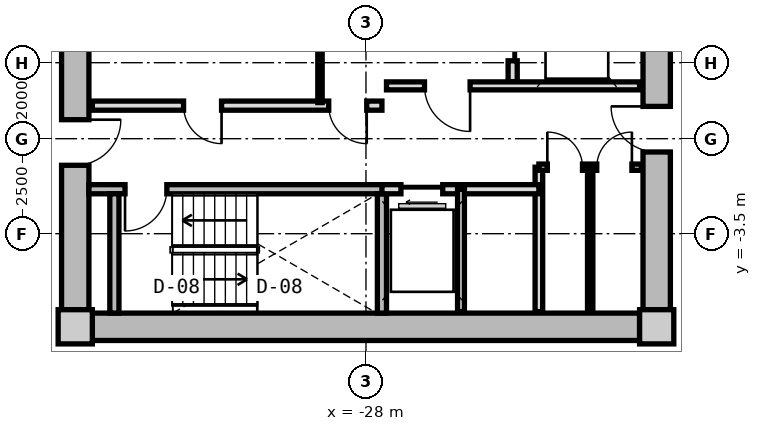
"""IFC4 building model, lengths in metres.
Left out: names, types, materials, properties, quantities, classifications, styles, units other than length and angle.
Written with IfcOpenShell. Run it as: python <this file> out.ifc"""

import sys

from ifc_helpers import new_model, si_unit, direction, frame, frame_2d, origin, origin_2d, place, context, subcontext, project, spatial, rectangle, extrude, source, transform, mapped, element, fill, save


model = new_model("IFC4")
c1 = context("Model", 3, precision=1e-05, world=origin(), true_north=direction((0.0, 1.0)))
c2 = subcontext(c1, "Body", "Model", "MODEL_VIEW")
j1 = project(units=[si_unit("LENGTHUNIT", "METRE"), si_unit("PLANEANGLEUNIT", "RADIAN")], contexts=[c1])
p1 = place(None, origin())
s1 = spatial("IfcSite", under=j1, at=p1, CompositionType="ELEMENT")
p2 = place(p1, origin())
s2 = spatial("IfcBuilding", under=s1, at=p2, CompositionType="ELEMENT")
p3 = place(p2, frame((0.0, 0.0, 126.75)))
s3 = spatial("IfcBuildingStorey", under=s2, at=p3, CompositionType="ELEMENT", Elevation=126.75)
m1 = source(origin(), c2, "Body", "SweptSolid", [
    extrude(rectangle(XDim=0.9, YDim=0.9, at=origin_2d()), origin(), (0.0, 0.0, 1.0), 3.05),
])
for number, where, z_axis, x_axis in (
    (1, (-35.65, -5.95, 0.0), (0.0, 0.0, 1.0), (1.0, 0.0, 0.0)),
    (2, (-20.35, -5.95, 0.0), (0.0, 0.0, 1.0), (1.0, 0.0, 0.0)),
):
    element("IfcColumn", number, at=place(p3, frame(where, z_axis=z_axis, x_axis=x_axis)), inside=s3, PredefinedType="COLUMN", context=c2, shape_type="MappedRepresentation", body=[
        mapped(m1, transform((0.0, 0.0, 0.0), x_axis=(1.0, 0.0, 0.0), y_axis=(0.0, 1.0, 0.0), z_axis=(0.0, 0.0, 1.0), scale=1.0)),
    ])
m2 = source(origin(), c2, "Body", "SweptSolid", [
    extrude(rectangle(XDim=14.4, YDim=0.72, at=frame_2d((7.2, 0.0))), origin(), (0.0, 0.0, 1.0), 2.73),
])
p4 = place(p3, frame((-20.8, -5.95, 0.0), z_axis=(0.0, 0.0, 1.0), x_axis=(-1.0, 0.0, 0.0)))
e3 = element("IfcWall", 3, at=p4, inside=s3, PredefinedType="SHEAR", context=c2, shape_type="MappedRepresentation", body=[
    mapped(m2, transform((0.0, 0.0, 0.0), x_axis=(1.0, 0.0, 0.0), y_axis=(0.0, 1.0, 0.0), z_axis=(0.0, 0.0, 1.0), scale=1.0)),
])
m3 = source(origin(), c2, "Body", "SweptSolid", [
    extrude(rectangle(XDim=11.0, YDim=0.72, at=frame_2d((5.5, 0.0))), origin(), (0.0, 0.0, 1.0), 2.73),
])
p5 = place(p3, frame((-35.65, -5.5, 0.0), z_axis=(0.0, 0.0, 1.0), x_axis=(0.0, 1.0, 0.0)))
e4 = element("IfcWall", 4, at=p5, inside=s3, PredefinedType="SHEAR", context=c2, shape_type="MappedRepresentation", body=[
    mapped(m3, transform((0.0, 0.0, 0.0), x_axis=(1.0, 0.0, 0.0), y_axis=(0.0, 1.0, 0.0), z_axis=(0.0, 0.0, 1.0), scale=1.0)),
])
p6 = place(p5, frame((3.8, 0.0, 0.0)))
e5 = element("IfcOpeningElement", 5, at=p6, cuts=e4, PredefinedType="OPENING", context=c2, shape_type="SweptSolid", body=[
    extrude(rectangle(XDim=1.2, YDim=2.15, at=frame_2d((0.6, 1.075))), frame((0.0, 0.37, 0.0), z_axis=(0.0, -1.0, 0.0), x_axis=(1.0, 0.0, 0.0)), (0.0, 0.0, 1.0), 0.74),
])
p7 = place(p3, frame((-20.35, 5.5, 0.0), z_axis=(0.0, 0.0, 1.0), x_axis=(0.0, -1.0, 0.0)))
e6 = element("IfcWall", 6, at=p7, inside=s3, PredefinedType="SHEAR", context=c2, shape_type="MappedRepresentation", body=[
    mapped(m3, transform((0.0, 0.0, 0.0), x_axis=(1.0, 0.0, 0.0), y_axis=(0.0, 1.0, 0.0), z_axis=(0.0, 0.0, 1.0), scale=1.0)),
])
p8 = place(p7, frame((5.65, 0.0, 0.0)))
e7 = element("IfcOpeningElement", 7, at=p8, cuts=e6, PredefinedType="OPENING", context=c2, shape_type="SweptSolid", body=[
    extrude(rectangle(XDim=1.2, YDim=2.15, at=frame_2d((0.6, 1.075))), frame((0.0, 0.37, 0.0), z_axis=(0.0, -1.0, 0.0), x_axis=(1.0, 0.0, 0.0)), (0.0, 0.0, 1.0), 0.74),
])
m4 = source(origin(), c2, "Body", "SweptSolid", [
    extrude(rectangle(XDim=7.83, YDim=0.24, at=frame_2d((3.915, 0.0))), origin(), (0.0, 0.0, 1.0), 2.73),
])
p9 = place(p3, frame((-35.29, -2.33, 0.0), z_axis=(0.0, 0.0, 1.0), x_axis=(1.0, 0.0, 0.0)))
e8 = element("IfcWall", 8, at=p9, inside=s3, PredefinedType="PARTITIONING", context=c2, shape_type="MappedRepresentation", body=[
    mapped(m4, transform((0.0, 0.0, 0.0), x_axis=(1.0, 0.0, 0.0), y_axis=(0.0, 1.0, 0.0), z_axis=(0.0, 0.0, 1.0), scale=1.0)),
])
p10 = place(p9, frame((0.95, 0.0, 0.0)))
e9 = element("IfcOpeningElement", 9, at=p10, cuts=e8, PredefinedType="OPENING", context=c2, shape_type="SweptSolid", body=[
    extrude(rectangle(XDim=1.1, YDim=2.15, at=frame_2d((0.55, 1.075))), frame((0.0, 0.13, 0.0), z_axis=(0.0, -1.0, 0.0), x_axis=(1.0, 0.0, 0.0)), (0.0, 0.0, 1.0), 0.26),
])
m5 = source(origin(), c2, "Body", "SweptSolid", [
    extrude(rectangle(XDim=3.14, YDim=0.24, at=frame_2d((1.57, 0.0))), origin(), (0.0, 0.0, 1.0), 2.73),
])
for number, where, z_axis, x_axis in (
    (10, (-34.62, -5.59, 0.0), (0.0, 0.0, 1.0), (0.0, 1.0, 0.0)),
    (11, (-27.58, -5.59, 0.0), (0.0, 0.0, 1.0), (0.0, 1.0, 0.0)),
):
    element("IfcWall", number, at=place(p3, frame(where, z_axis=z_axis, x_axis=x_axis)), inside=s3, PredefinedType="PARTITIONING", context=c2, shape_type="MappedRepresentation", body=[
        mapped(m5, transform((0.0, 0.0, 0.0), x_axis=(1.0, 0.0, 0.0), y_axis=(0.0, 1.0, 0.0), z_axis=(0.0, 0.0, 1.0), scale=1.0)),
    ])
m6 = source(origin(), c2, "Body", "SweptSolid", [
    extrude(rectangle(XDim=5.0, YDim=0.24, at=frame_2d((2.5, 0.0))), origin(), (0.0, 0.0, 1.0), 2.715),
])
p11 = place(p3, frame((-24.14, 0.5, 0.0), z_axis=(0.0, 0.0, 1.0), x_axis=(0.0, 1.0, 0.0)))
e12 = element("IfcWall", 12, at=p11, inside=s3, PredefinedType="PARTITIONING", context=c2, shape_type="MappedRepresentation", body=[
    mapped(m6, transform((0.0, 0.0, 0.0), x_axis=(1.0, 0.0, 0.0), y_axis=(0.0, 1.0, 0.0), z_axis=(0.0, 0.0, 1.0), scale=1.0)),
])
p12 = place(p11, frame((3.05, 0.0, 0.0)))
e13 = element("IfcOpeningElement", 13, at=p12, cuts=e12, PredefinedType="OPENING", context=c2, shape_type="SweptSolid", body=[
    extrude(rectangle(XDim=1.3, YDim=2.2, at=frame_2d((0.65, 1.1))), frame((0.0, 0.13, 0.0), z_axis=(0.0, -1.0, 0.0), x_axis=(1.0, 0.0, 0.0)), (0.0, 0.0, 1.0), 0.26),
])
p13 = place(p11, frame((0.55, 0.0, 0.0)))
e14 = element("IfcOpeningElement", 14, at=p13, cuts=e12, PredefinedType="OPENING", context=c2, shape_type="SweptSolid", body=[
    extrude(rectangle(XDim=1.3, YDim=2.2, at=frame_2d((0.65, 1.1))), frame((0.0, 0.13, 0.0), z_axis=(0.0, -1.0, 0.0), x_axis=(1.0, 0.0, 0.0)), (0.0, 0.0, 1.0), 0.26),
])
m7 = source(origin(), c2, "Body", "SweptSolid", [
    extrude(rectangle(XDim=6.66, YDim=0.21, at=frame_2d((3.33, 0.0))), origin(), (0.0, 0.0, 1.0), 2.715),
])
p14 = place(p3, frame((-27.46, 0.39, 0.0), z_axis=(0.0, 0.0, 1.0), x_axis=(1.0, 0.0, 0.0)))
e15 = element("IfcWall", 15, at=p14, inside=s3, PredefinedType="PARTITIONING", context=c2, shape_type="MappedRepresentation", body=[
    mapped(m7, transform((0.0, 0.0, 0.0), x_axis=(1.0, 0.0, 0.0), y_axis=(0.0, 1.0, 0.0), z_axis=(0.0, 0.0, 1.0), scale=1.0)),
])
p15 = place(p14, frame((1.0, 0.0, 0.0)))
e16 = element("IfcOpeningElement", 16, at=p15, cuts=e15, PredefinedType="OPENING", context=c2, shape_type="SweptSolid", body=[
    extrude(rectangle(XDim=1.2, YDim=2.15, at=frame_2d((0.6, 1.075))), frame((0.0, 0.115, 0.0), z_axis=(0.0, -1.0, 0.0), x_axis=(1.0, 0.0, 0.0)), (0.0, 0.0, 1.0), 0.23),
])
m8 = source(origin(), c2, "Body", "SweptSolid", [
    extrude(rectangle(XDim=7.62, YDim=0.24, at=frame_2d((3.81, 0.0))), origin(), (0.0, 0.0, 1.0), 2.715),
])
p16 = place(p3, frame((-35.2, -0.13, 0.0), z_axis=(0.0, 0.0, 1.0), x_axis=(1.0, 0.0, 0.0)))
e17 = element("IfcWall", 17, at=p16, inside=s3, PredefinedType="PARTITIONING", context=c2, shape_type="MappedRepresentation", body=[
    mapped(m8, transform((0.0, 0.0, 0.0), x_axis=(1.0, 0.0, 0.0), y_axis=(0.0, 1.0, 0.0), z_axis=(0.0, 0.0, 1.0), scale=1.0)),
])
p17 = place(p16, frame((6.22, 0.0, 0.0)))
e18 = element("IfcOpeningElement", 18, at=p17, cuts=e17, PredefinedType="OPENING", context=c2, shape_type="SweptSolid", body=[
    extrude(rectangle(XDim=1.0, YDim=2.1, at=frame_2d((0.5, 1.05))), frame((0.0, 0.13, 0.0), z_axis=(0.0, -1.0, 0.0), x_axis=(1.0, 0.0, 0.0)), (0.0, 0.0, 1.0), 0.26),
])
p18 = place(p16, frame((2.4, 0.0, 0.0)))
e19 = element("IfcOpeningElement", 19, at=p18, cuts=e17, PredefinedType="OPENING", context=c2, shape_type="SweptSolid", body=[
    extrude(rectangle(XDim=1.0, YDim=2.1, at=frame_2d((0.5, 1.05))), frame((0.0, 0.13, 0.0), z_axis=(0.0, -1.0, 0.0), x_axis=(1.0, 0.0, 0.0)), (0.0, 0.0, 1.0), 0.26),
])
m9 = source(origin(), c2, "Body", "SweptSolid", [
    extrude(rectangle(XDim=2.33, YDim=0.115, at=frame_2d((1.165, 0.0))), origin(), (0.0, 0.0, 1.0), 2.715),
])
p19 = place(p3, frame((-29.21, -0.05, 0.0), z_axis=(0.0, 0.0, 1.0), x_axis=(0.0, 1.0, 0.0)))
e20 = element("IfcWall", 20, at=p19, inside=s3, PredefinedType="PARTITIONING", context=c2, shape_type="MappedRepresentation", body=[
    mapped(m9, transform((0.0, 0.0, 0.0), x_axis=(1.0, 0.0, 0.0), y_axis=(0.0, 1.0, 0.0), z_axis=(0.0, 0.0, 1.0), scale=1.0)),
])
m10 = source(origin(), c2, "Body", "SweptSolid", [
    extrude(rectangle(XDim=3.8, YDim=0.2, at=frame_2d((1.9, 0.0))), origin(), (0.0, 0.0, 1.0), 2.715),
])
p20 = place(p3, frame((-23.45, -5.55, 0.0), z_axis=(0.0, 0.0, 1.0), x_axis=(0.0, 1.0, 0.0)))
e21 = element("IfcWall", 21, at=p20, inside=s3, PredefinedType="PARTITIONING", context=c2, shape_type="MappedRepresentation", body=[
    mapped(m10, transform((0.0, 0.0, 0.0), x_axis=(1.0, 0.0, 0.0), y_axis=(0.0, 1.0, 0.0), z_axis=(0.0, 0.0, 1.0), scale=1.0)),
])
m11 = source(origin(), c2, "Body", "SweptSolid", [
    extrude(rectangle(XDim=4.13, YDim=0.24, at=frame_2d((2.065, 0.0))), origin(), (0.0, 0.0, 1.0), 2.715),
])
p21 = place(p3, frame((-27.58, -2.33, 0.0), z_axis=(0.0, 0.0, 1.0), x_axis=(1.0, 0.0, 0.0)))
e22 = element("IfcWall", 22, at=p21, inside=s3, PredefinedType="PARTITIONING", context=c2, shape_type="MappedRepresentation", body=[
    mapped(m11, transform((0.0, 0.0, 0.0), x_axis=(1.0, 0.0, 0.0), y_axis=(0.0, 1.0, 0.0), z_axis=(0.0, 0.0, 1.0), scale=1.0)),
])
p22 = place(p21, frame((0.5, 0.0, 0.0)))
e23 = element("IfcOpeningElement", 23, at=p22, cuts=e22, PredefinedType="OPENING", context=c2, shape_type="SweptSolid", body=[
    extrude(rectangle(XDim=1.1, YDim=2.2, at=frame_2d((0.55, 1.1))), frame((0.0, 0.13, 0.0), z_axis=(0.0, -1.0, 0.0), x_axis=(1.0, 0.0, 0.0)), (0.0, 0.0, 1.0), 0.26),
])
m12 = source(origin(), c2, "Body", "SweptSolid", [
    extrude(rectangle(XDim=3.22, YDim=0.18, at=frame_2d((1.61, 0.0))), origin(), (0.0, 0.0, 1.0), 2.715),
])
p23 = place(p3, frame((-25.5, -5.55, 0.0), z_axis=(0.0, 0.0, 1.0), x_axis=(0.0, 1.0, 0.0)))
e24 = element("IfcWall", 24, at=p23, inside=s3, PredefinedType="PARTITIONING", context=c2, shape_type="MappedRepresentation", body=[
    mapped(m12, transform((0.0, 0.0, 0.0), x_axis=(1.0, 0.0, 0.0), y_axis=(0.0, 1.0, 0.0), z_axis=(0.0, 0.0, 1.0), scale=1.0)),
])
m13 = source(origin(), c2, "Body", "SweptSolid", [
    extrude(rectangle(XDim=2.7, YDim=0.165, at=frame_2d((1.35, 0.0))), origin(), (0.0, 0.0, 1.0), 2.715),
])
p24 = place(p3, frame((-23.45, -1.75, 0.0), z_axis=(0.0, 0.0, 1.0), x_axis=(1.0, 0.0, 0.0)))
e25 = element("IfcWall", 25, at=p24, inside=s3, PredefinedType="PARTITIONING", context=c2, shape_type="MappedRepresentation", body=[
    mapped(m13, transform((0.0, 0.0, 0.0), x_axis=(1.0, 0.0, 0.0), y_axis=(0.0, 1.0, 0.0), z_axis=(0.0, 0.0, 1.0), scale=1.0)),
])
p25 = place(p24, frame((0.222, 0.0, 0.0)))
e26 = element("IfcOpeningElement", 26, at=p25, cuts=e25, PredefinedType="OPENING", context=c2, shape_type="SweptSolid", body=[
    extrude(rectangle(XDim=0.925, YDim=2.1, at=frame_2d((0.462, 1.05))), frame((0.0, 0.093, 0.0), z_axis=(0.0, -1.0, 0.0), x_axis=(1.0, 0.0, 0.0)), (0.0, 0.0, 1.0), 0.185),
])
p26 = place(p24, frame((1.522, 0.0, 0.0)))
e27 = element("IfcOpeningElement", 27, at=p26, cuts=e25, PredefinedType="OPENING", context=c2, shape_type="SweptSolid", body=[
    extrude(rectangle(XDim=0.925, YDim=2.1, at=frame_2d((0.462, 1.05))), frame((0.0, 0.093, 0.0), z_axis=(0.0, -1.0, 0.0), x_axis=(1.0, 0.0, 0.0)), (0.0, 0.0, 1.0), 0.185),
])
m14 = source(origin(), c2, "Body", "SweptSolid", [
    extrude(rectangle(XDim=3.8, YDim=0.14, at=frame_2d((1.9, 0.0))), origin(), (0.0, 0.0, 1.0), 2.715),
])
p27 = place(p3, frame((-22.1, -5.55, 0.0), z_axis=(0.0, 0.0, 1.0), x_axis=(0.0, 1.0, 0.0)))
e28 = element("IfcWall", 28, at=p27, inside=s3, PredefinedType="PARTITIONING", context=c2, shape_type="MappedRepresentation", body=[
    mapped(m14, transform((0.0, 0.0, 0.0), x_axis=(1.0, 0.0, 0.0), y_axis=(0.0, 1.0, 0.0), z_axis=(0.0, 0.0, 1.0), scale=1.0)),
])
m15 = source(origin(), c2, "Body", "SweptSolid", [
    extrude(rectangle(XDim=1.1, YDim=2.15, at=frame_2d((0.55, 1.075))), frame((0.0, 0.025, 0.0), z_axis=(0.0, -1.0, 0.0), x_axis=(1.0, 0.0, 0.0)), (0.0, 0.0, 1.0), 0.05),
])
p28 = place(p10, frame((1.1, 0.0, 0.0), z_axis=(0.0, 0.0, 1.0), x_axis=(-1.0, 0.0, 0.0)))
e29 = element("IfcDoor", 29, at=p28, inside=s3, OperationType="SINGLE_SWING_RIGHT", PredefinedType="DOOR", context=c2, shape_type="MappedRepresentation", body=[
    mapped(m15, transform((0.0, 0.0, 0.0), x_axis=(1.0, 0.0, 0.0), y_axis=(0.0, 1.0, 0.0), z_axis=(0.0, 0.0, 1.0), scale=1.0)),
])
fill(e9, e29)
m16 = source(origin(), c2, "Body", "SweptSolid", [
    extrude(rectangle(XDim=1.3, YDim=2.2, at=frame_2d((0.65, 1.1))), frame((0.0, 0.025, 0.0), z_axis=(0.0, -1.0, 0.0), x_axis=(1.0, 0.0, 0.0)), (0.0, 0.0, 1.0), 0.05),
])
p29 = place(p13, origin())
e30 = element("IfcDoor", 30, at=p29, inside=s3, OperationType="SLIDING_TO_RIGHT", PredefinedType="DOOR", context=c2, shape_type="MappedRepresentation", body=[
    mapped(m16, transform((0.0, 0.0, 0.0), x_axis=(1.0, 0.0, 0.0), y_axis=(0.0, 1.0, 0.0), z_axis=(0.0, 0.0, 1.0), scale=1.0)),
])
fill(e14, e30)
m17 = source(origin(), c2, "Body", "SweptSolid", [
    extrude(rectangle(XDim=1.2, YDim=2.15, at=frame_2d((0.6, 1.075))), frame((0.0, 0.025, 0.0), z_axis=(0.0, -1.0, 0.0), x_axis=(1.0, 0.0, 0.0)), (0.0, 0.0, 1.0), 0.05),
])
p30 = place(p15, frame((1.2, 0.0, 0.0), z_axis=(0.0, 0.0, 1.0), x_axis=(-1.0, 0.0, 0.0)))
e31 = element("IfcDoor", 31, at=p30, inside=s3, OperationType="SINGLE_SWING_LEFT", PredefinedType="DOOR", context=c2, shape_type="MappedRepresentation", body=[
    mapped(m17, transform((0.0, 0.0, 0.0), x_axis=(1.0, 0.0, 0.0), y_axis=(0.0, 1.0, 0.0), z_axis=(0.0, 0.0, 1.0), scale=1.0)),
])
fill(e16, e31)
p31 = place(p6, frame((1.2, 0.0, 0.0), z_axis=(0.0, 0.0, 1.0), x_axis=(-1.0, 0.0, 0.0)))
e32 = element("IfcDoor", 32, at=p31, inside=s3, OperationType="SINGLE_SWING_LEFT", PredefinedType="DOOR", context=c2, shape_type="MappedRepresentation", body=[
    mapped(m17, transform((0.0, 0.0, 0.0), x_axis=(1.0, 0.0, 0.0), y_axis=(0.0, 1.0, 0.0), z_axis=(0.0, 0.0, 1.0), scale=1.0)),
])
fill(e5, e32)
p32 = place(p8, frame((1.2, 0.0, 0.0), z_axis=(0.0, 0.0, 1.0), x_axis=(-1.0, 0.0, 0.0)))
e33 = element("IfcDoor", 33, at=p32, inside=s3, OperationType="SINGLE_SWING_RIGHT", PredefinedType="DOOR", context=c2, shape_type="MappedRepresentation", body=[
    mapped(m17, transform((0.0, 0.0, 0.0), x_axis=(1.0, 0.0, 0.0), y_axis=(0.0, 1.0, 0.0), z_axis=(0.0, 0.0, 1.0), scale=1.0)),
])
fill(e7, e33)
m18 = source(origin(), c2, "Body", "SweptSolid", [
    extrude(rectangle(XDim=1.0, YDim=2.1, at=frame_2d((0.5, 1.05))), frame((0.0, 0.025, 0.0), z_axis=(0.0, -1.0, 0.0), x_axis=(1.0, 0.0, 0.0)), (0.0, 0.0, 1.0), 0.05),
])
p33 = place(p17, frame((1.0, 0.0, 0.0), z_axis=(0.0, 0.0, 1.0), x_axis=(-1.0, 0.0, 0.0)))
e34 = element("IfcDoor", 34, at=p33, inside=s3, OperationType="SINGLE_SWING_LEFT", PredefinedType="DOOR", context=c2, shape_type="MappedRepresentation", body=[
    mapped(m18, transform((0.0, 0.0, 0.0), x_axis=(1.0, 0.0, 0.0), y_axis=(0.0, 1.0, 0.0), z_axis=(0.0, 0.0, 1.0), scale=1.0)),
])
fill(e18, e34)
p34 = place(p18, frame((1.0, 0.0, 0.0), z_axis=(0.0, 0.0, 1.0), x_axis=(-1.0, 0.0, 0.0)))
e35 = element("IfcDoor", 35, at=p34, inside=s3, OperationType="SINGLE_SWING_LEFT", PredefinedType="DOOR", context=c2, shape_type="MappedRepresentation", body=[
    mapped(m18, transform((0.0, 0.0, 0.0), x_axis=(1.0, 0.0, 0.0), y_axis=(0.0, 1.0, 0.0), z_axis=(0.0, 0.0, 1.0), scale=1.0)),
])
fill(e19, e35)
m19 = source(origin(), c2, "Body", "SweptSolid", [
    extrude(rectangle(XDim=1.1, YDim=2.2, at=frame_2d((0.55, 1.1))), frame((0.0, 0.025, 0.0), z_axis=(0.0, -1.0, 0.0), x_axis=(1.0, 0.0, 0.0)), (0.0, 0.0, 1.0), 0.05),
])
p35 = place(p22, frame((1.1, 0.0, 0.0), z_axis=(0.0, 0.0, 1.0), x_axis=(-1.0, 0.0, 0.0)))
e36 = element("IfcDoor", 36, at=p35, inside=s3, OperationType="SLIDING_TO_LEFT", PredefinedType="DOOR", context=c2, shape_type="MappedRepresentation", body=[
    mapped(m19, transform((0.0, 0.0, 0.0), x_axis=(1.0, 0.0, 0.0), y_axis=(0.0, 1.0, 0.0), z_axis=(0.0, 0.0, 1.0), scale=1.0)),
])
fill(e23, e36)
m20 = source(origin(), c2, "Body", "SweptSolid", [
    extrude(rectangle(XDim=0.925, YDim=2.1, at=frame_2d((0.462, 1.05))), frame((0.0, 0.025, 0.0), z_axis=(0.0, -1.0, 0.0), x_axis=(1.0, 0.0, 0.0)), (0.0, 0.0, 1.0), 0.05),
])
p36 = place(p25, origin())
e37 = element("IfcDoor", 37, at=p36, inside=s3, OperationType="SINGLE_SWING_LEFT", PredefinedType="DOOR", context=c2, shape_type="MappedRepresentation", body=[
    mapped(m20, transform((0.0, 0.0, 0.0), x_axis=(1.0, 0.0, 0.0), y_axis=(0.0, 1.0, 0.0), z_axis=(0.0, 0.0, 1.0), scale=1.0)),
])
fill(e26, e37)
p37 = place(p26, origin())
e38 = element("IfcDoor", 38, at=p37, inside=s3, OperationType="SINGLE_SWING_RIGHT", PredefinedType="DOOR", context=c2, shape_type="MappedRepresentation", body=[
    mapped(m20, transform((0.0, 0.0, 0.0), x_axis=(1.0, 0.0, 0.0), y_axis=(0.0, 1.0, 0.0), z_axis=(0.0, 0.0, 1.0), scale=1.0)),
])
fill(e27, e38)
save(model, sys.argv[1])
